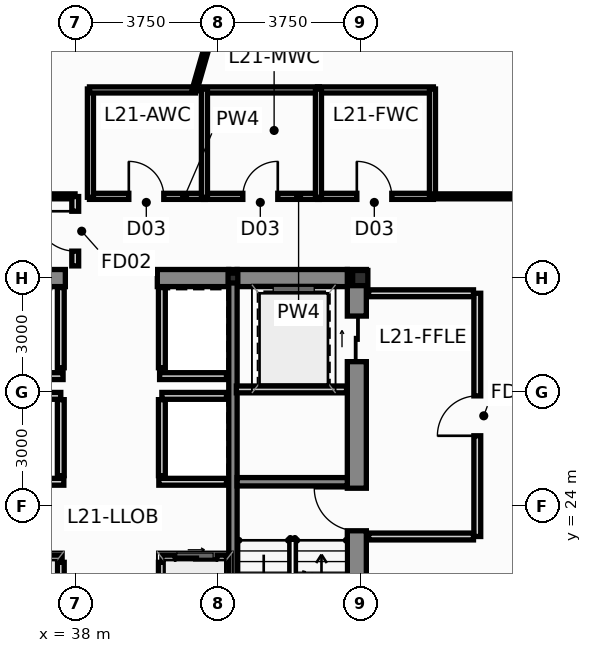
"""IFC4 building model, lengths in metres.
Left out: names, types, materials, properties, quantities, classifications, styles, units other than length and angle.
Written with IfcOpenShell. Run it as: python <this file> out.ifc"""

import sys

from ifc_helpers import new_model, si_unit, direction, frame, frame_2d, origin, origin_2d, place, context, subcontext, project, spatial, rectangle, i_section, extrude, source, transform, mapped, element, fill, save


model = new_model("IFC4")
c1 = context("Model", 3, precision=1e-05, world=origin(), true_north=direction((0.0, 1.0)))
c2 = subcontext(c1, "Body", "Model", "MODEL_VIEW")
j1 = project(units=[si_unit("LENGTHUNIT", "METRE"), si_unit("PLANEANGLEUNIT", "RADIAN")], contexts=[c1])
p1 = place(None, origin())
s1 = spatial("IfcSite", under=j1, at=p1, CompositionType="ELEMENT")
p2 = place(p1, origin())
s2 = spatial("IfcBuilding", under=s1, at=p2, CompositionType="ELEMENT")
p3 = place(p2, frame((0.0, 0.0, 83.5)))
s3 = spatial("IfcBuildingStorey", under=s2, at=p3, CompositionType="ELEMENT", Elevation=83.5)
m1 = source(origin(), c2, "Body", "SweptSolid", [
    extrude(i_section(OverallWidth=0.4, OverallDepth=0.4, WebThickness=0.02, FlangeThickness=0.032, at=origin_2d()), origin(), (0.0, 0.0, 1.0), 3.65),
])
p4 = place(p3, frame((45.5, 30.0, 0.0), z_axis=(0.0, 0.0, 1.0), x_axis=(1.0, 0.0, 0.0)))
e1 = element("IfcColumn", 1, at=p4, inside=s3, PredefinedType="COLUMN", context=c2, shape_type="MappedRepresentation", body=[
    mapped(m1, transform((0.0, 0.0, 0.0), scale=1.0)),
])
m2 = source(origin(), c2, "Body", "SweptSolid", [
    extrude(i_section(OverallWidth=0.256, OverallDepth=0.26, WebThickness=0.01, FlangeThickness=0.017, at=origin_2d()), origin(), (0.0, 0.0, 1.0), 3.65),
])
p5 = place(p3, frame((42.15, 30.0, 0.0), z_axis=(0.0, 0.0, 1.0), x_axis=(1.0, 0.0, 0.0)))
e2 = element("IfcColumn", 2, at=p5, inside=s3, PredefinedType="COLUMN", context=c2, shape_type="MappedRepresentation", body=[
    mapped(m2, transform((0.0, 0.0, 0.0), scale=1.0)),
])
p6 = place(p3, frame((45.41, 16.95, 0.0), z_axis=(0.0, 0.0, 1.0), x_axis=(0.0, 1.0, 0.0)))
e3 = element("IfcWall", 3, at=p6, inside=s3, PredefinedType="SHEAR", context=c2, shape_type="SweptSolid", body=[
    extrude(rectangle(XDim=13.275, YDim=0.5, at=frame_2d((6.638, 0.0))), origin(), (0.0, 0.0, 1.0), 3.65),
])
p7 = place(p6, frame((6.4, 0.0, 0.0)))
e4 = element("IfcOpeningElement", 4, at=p7, cuts=e3, PredefinedType="OPENING", context=c2, shape_type="SweptSolid", body=[
    extrude(rectangle(XDim=1.12, YDim=2.15, at=frame_2d((0.56, 1.075))), frame((0.0, 0.262, 0.0), z_axis=(0.0, -1.0, 0.0), x_axis=(1.0, 0.0, 0.0)), (0.0, 0.0, 1.0), 0.524),
])
p8 = place(p6, frame((10.85, 0.0, 0.0)))
e5 = element("IfcOpeningElement", 5, at=p8, cuts=e3, PredefinedType="OPENING", context=c2, shape_type="SweptSolid", body=[
    extrude(rectangle(XDim=1.2, YDim=2.2, at=frame_2d((0.6, 1.1))), frame((0.0, 0.262, 0.0), z_axis=(0.0, -1.0, 0.0), x_axis=(1.0, 0.0, 0.0)), (0.0, 0.0, 1.0), 0.524),
])
p9 = place(p3, frame((33.96, 30.0, 0.0), z_axis=(0.0, 0.0, 1.0), x_axis=(1.0, 0.0, 0.0)))
e6 = element("IfcWall", 6, at=p9, inside=s3, PredefinedType="SHEAR", context=c2, shape_type="SweptSolid", body=[
    extrude(rectangle(XDim=3.78, YDim=0.45, at=frame_2d((1.89, 0.0))), origin(), (0.0, 0.0, 1.0), 3.65),
])
p10 = place(p3, frame((40.16, 30.0, 0.0), z_axis=(0.0, 0.0, 1.0), x_axis=(1.0, 0.0, 0.0)))
e7 = element("IfcWall", 7, at=p10, inside=s3, PredefinedType="SHEAR", context=c2, shape_type="SweptSolid", body=[
    extrude(rectangle(XDim=1.88, YDim=0.45, at=frame_2d((0.94, 0.0))), origin(), (0.0, 0.0, 1.0), 3.65),
])
p11 = place(p3, frame((42.26, 30.0, 0.0), z_axis=(0.0, 0.0, 1.0), x_axis=(1.0, 0.0, 0.0)))
e8 = element("IfcWall", 8, at=p11, inside=s3, PredefinedType="SHEAR", context=c2, shape_type="SweptSolid", body=[
    extrude(rectangle(XDim=2.9, YDim=0.45, at=frame_2d((1.45, 0.0))), origin(), (0.0, 0.0, 1.0), 3.65),
])
p12 = place(p3, frame((42.15, 16.95, 0.0), z_axis=(0.0, 0.0, 1.0), x_axis=(0.0, 1.0, 0.0)))
e9 = element("IfcWall", 9, at=p12, inside=s3, PredefinedType="SHEAR", context=c2, shape_type="SweptSolid", body=[
    extrude(rectangle(XDim=13.275, YDim=0.22, at=frame_2d((6.638, 0.0))), origin(), (0.0, 0.0, 1.0), 3.65),
])
p13 = place(p3, frame((42.26, 24.64, 0.0), z_axis=(0.0, 0.0, 1.0), x_axis=(1.0, 0.0, 0.0)))
e10 = element("IfcWall", 10, at=p13, inside=s3, PredefinedType="SHEAR", context=c2, shape_type="SweptSolid", body=[
    extrude(rectangle(XDim=2.9, YDim=0.22, at=frame_2d((1.45, 0.0))), origin(), (0.0, 0.0, 1.0), 3.65),
])
p14 = place(p3, frame((34.02, 22.62, 0.0), z_axis=(0.0, 0.0, 1.0), x_axis=(1.0, 0.0, 0.0)))
e11 = element("IfcWall", 11, at=p14, inside=s3, PredefinedType="PARTITIONING", context=c2, shape_type="SweptSolid", body=[
    extrude(rectangle(XDim=3.6, YDim=0.18, at=frame_2d((1.8, 0.0))), origin(), (0.0, 0.0, 1.0), 3.4),
])
p15 = place(p14, frame((0.32, 0.0, 0.0)))
e12 = element("IfcOpeningElement", 12, at=p15, cuts=e11, PredefinedType="OPENING", context=c2, shape_type="SweptSolid", body=[
    extrude(rectangle(XDim=1.1, YDim=2.2, at=frame_2d((0.55, 1.1))), frame((0.0, 0.102, 0.0), z_axis=(0.0, -1.0, 0.0), x_axis=(1.0, 0.0, 0.0)), (0.0, 0.0, 1.0), 0.204),
])
p16 = place(p14, frame((2.12, 0.0, 0.0)))
e13 = element("IfcOpeningElement", 13, at=p16, cuts=e11, PredefinedType="OPENING", context=c2, shape_type="SweptSolid", body=[
    extrude(rectangle(XDim=1.1, YDim=2.2, at=frame_2d((0.55, 1.1))), frame((0.0, 0.102, 0.0), z_axis=(0.0, -1.0, 0.0), x_axis=(1.0, 0.0, 0.0)), (0.0, 0.0, 1.0), 0.204),
])
p17 = place(p3, frame((40.28, 22.62, 0.0), z_axis=(0.0, 0.0, 1.0), x_axis=(1.0, 0.0, 0.0)))
e14 = element("IfcWall", 14, at=p17, inside=s3, PredefinedType="PARTITIONING", context=c2, shape_type="SweptSolid", body=[
    extrude(rectangle(XDim=1.7, YDim=0.18, at=frame_2d((0.85, 0.0))), origin(), (0.0, 0.0, 1.0), 3.4),
])
p18 = place(p17, frame((0.35, 0.0, 0.0)))
e15 = element("IfcOpeningElement", 15, at=p18, cuts=e14, PredefinedType="OPENING", context=c2, shape_type="SweptSolid", body=[
    extrude(rectangle(XDim=1.1, YDim=2.2, at=frame_2d((0.55, 1.1))), frame((0.0, 0.102, 0.0), z_axis=(0.0, -1.0, 0.0), x_axis=(1.0, 0.0, 0.0)), (0.0, 0.0, 1.0), 0.204),
])
for number, where, z_axis, x_axis in (
    (16, (37.62, 20.52, 0.0), (0.0, 0.0, 1.0), (0.0, 1.0, 0.0)),
    (17, (40.28, 20.52, 0.0), (0.0, 0.0, 1.0), (0.0, 1.0, 0.0)),
):
    element("IfcWall", number, at=place(p3, frame(where, z_axis=z_axis, x_axis=x_axis)), inside=s3, PredefinedType="PARTITIONING", context=c2, shape_type="SweptSolid", body=[
        extrude(rectangle(XDim=2.0, YDim=0.18, at=frame_2d((1.0, 0.0))), origin(), (0.0, 0.0, 1.0), 3.4),
    ])
p19 = place(p3, frame((34.02, 26.9, 0.0), z_axis=(0.0, 0.0, 1.0), x_axis=(1.0, 0.0, 0.0)))
e18 = element("IfcWall", 18, at=p19, inside=s3, PredefinedType="PARTITIONING", context=c2, shape_type="SweptSolid", body=[
    extrude(rectangle(XDim=3.6, YDim=0.18, at=frame_2d((1.8, 0.0))), origin(), (0.0, 0.0, 1.0), 3.4),
])
p20 = place(p3, frame((40.28, 26.9, 0.0), z_axis=(0.0, 0.0, 1.0), x_axis=(1.0, 0.0, 0.0)))
e19 = element("IfcWall", 19, at=p20, inside=s3, PredefinedType="PARTITIONING", context=c2, shape_type="SweptSolid", body=[
    extrude(rectangle(XDim=1.7, YDim=0.18, at=frame_2d((0.85, 0.0))), origin(), (0.0, 0.0, 1.0), 3.4),
])
for number, where, z_axis, x_axis in (
    (20, (37.62, 24.8, 0.0), (0.0, 0.0, 1.0), (0.0, 1.0, 0.0)),
    (21, (40.28, 24.8, 0.0), (0.0, 0.0, 1.0), (0.0, 1.0, 0.0)),
):
    element("IfcWall", number, at=place(p3, frame(where, z_axis=z_axis, x_axis=x_axis)), inside=s3, PredefinedType="PARTITIONING", context=c2, shape_type="SweptSolid", body=[
        extrude(rectangle(XDim=2.0, YDim=0.18, at=frame_2d((1.0, 0.0))), origin(), (0.0, 0.0, 1.0), 3.4),
    ])
p21 = place(p3, frame((34.02, 24.64, 0.0), z_axis=(0.0, 0.0, 1.0), x_axis=(1.0, 0.0, 0.0)))
e22 = element("IfcWall", 22, at=p21, inside=s3, PredefinedType="PARTITIONING", context=c2, shape_type="SweptSolid", body=[
    extrude(rectangle(XDim=3.68, YDim=0.18, at=frame_2d((1.84, 0.0))), origin(), (0.0, 0.0, 1.0), 3.4),
])
p22 = place(p3, frame((40.2, 24.64, 0.0), z_axis=(0.0, 0.0, 1.0), x_axis=(1.0, 0.0, 0.0)))
e23 = element("IfcWall", 23, at=p22, inside=s3, PredefinedType="PARTITIONING", context=c2, shape_type="SweptSolid", body=[
    extrude(rectangle(XDim=1.78, YDim=0.18, at=frame_2d((0.89, 0.0))), origin(), (0.0, 0.0, 1.0), 3.4),
])
p23 = place(p3, frame((34.02, 27.42, 0.0), z_axis=(0.0, 0.0, 1.0), x_axis=(1.0, 0.0, 0.0)))
e24 = element("IfcWall", 24, at=p23, inside=s3, PredefinedType="PARTITIONING", context=c2, shape_type="SweptSolid", body=[
    extrude(rectangle(XDim=3.66, YDim=0.18, at=frame_2d((1.83, 0.0))), origin(), (0.0, 0.0, 1.0), 3.4),
])
p24 = place(p3, frame((40.22, 27.42, 0.0), z_axis=(0.0, 0.0, 1.0), x_axis=(1.0, 0.0, 0.0)))
e25 = element("IfcWall", 25, at=p24, inside=s3, PredefinedType="PARTITIONING", context=c2, shape_type="SweptSolid", body=[
    extrude(rectangle(XDim=1.76, YDim=0.18, at=frame_2d((0.88, 0.0))), origin(), (0.0, 0.0, 1.0), 3.4),
])
for number, where, z_axis, x_axis in (
    (26, (37.62, 27.64, 0.0), (0.0, 0.0, 1.0), (0.0, 1.0, 0.0)),
    (27, (40.28, 27.64, 0.0), (0.0, 0.0, 1.0), (0.0, 1.0, 0.0)),
):
    element("IfcWall", number, at=place(p3, frame(where, z_axis=z_axis, x_axis=x_axis)), inside=s3, PredefinedType="PARTITIONING", context=c2, shape_type="SweptSolid", body=[
        extrude(rectangle(XDim=2.11, YDim=0.18, at=frame_2d((1.055, 0.0))), origin(), (0.0, 0.0, 1.0), 3.4),
    ])
p25 = place(p3, frame((48.58, 23.2, 0.0), z_axis=(0.0, 0.0, 1.0), x_axis=(0.0, 1.0, 0.0)))
e28 = element("IfcWall", 28, at=p25, inside=s3, PredefinedType="PARTITIONING", context=c2, shape_type="SweptSolid", body=[
    extrude(rectangle(XDim=6.4, YDim=0.18, at=frame_2d((3.2, 0.0))), origin(), (0.0, 0.0, 1.0), 3.026),
])
p26 = place(p25, frame((2.65, 0.0, 0.0)))
e29 = element("IfcOpeningElement", 29, at=p26, cuts=e28, PredefinedType="OPENING", context=c2, shape_type="SweptSolid", body=[
    extrude(rectangle(XDim=1.05, YDim=2.15, at=frame_2d((0.525, 1.075))), frame((0.0, 0.102, 0.0), z_axis=(0.0, -1.0, 0.0), x_axis=(1.0, 0.0, 0.0)), (0.0, 0.0, 1.0), 0.204),
])
p27 = place(p3, frame((45.72, 23.2, 0.0), z_axis=(0.0, 0.0, 1.0), x_axis=(1.0, 0.0, 0.0)))
e30 = element("IfcWall", 30, at=p27, inside=s3, PredefinedType="PARTITIONING", context=c2, shape_type="SweptSolid", body=[
    extrude(rectangle(XDim=2.76, YDim=0.18, at=frame_2d((1.38, 0.0))), origin(), (0.0, 0.0, 1.0), 3.4),
])
p28 = place(p3, frame((45.72, 29.6, 0.0), z_axis=(0.0, 0.0, 1.0), x_axis=(1.0, 0.0, 0.0)))
e31 = element("IfcWall", 31, at=p28, inside=s3, PredefinedType="PARTITIONING", context=c2, shape_type="SweptSolid", body=[
    extrude(rectangle(XDim=2.76, YDim=0.18, at=frame_2d((1.38, 0.0))), origin(), (0.0, 0.0, 1.0), 2.783),
])
p29 = place(p3, frame((42.24, 27.07, 0.0), z_axis=(0.0, 0.0, 1.0), x_axis=(1.0, 0.0, 0.0)))
e32 = element("IfcWall", 32, at=p29, inside=s3, PredefinedType="PARTITIONING", context=c2, shape_type="SweptSolid", body=[
    extrude(rectangle(XDim=2.9, YDim=0.18, at=frame_2d((1.45, 0.0))), origin(), (0.0, 0.0, 1.0), 3.4),
])
p30 = place(p3, frame((38.375, 32.15, 0.0), z_axis=(0.0, 0.0, 1.0), x_axis=(1.0, 0.0, 0.0)))
e33 = element("IfcWall", 33, at=p30, inside=s3, PredefinedType="PLUMBINGWALL", context=c2, shape_type="SweptSolid", body=[
    extrude(rectangle(XDim=3.05, YDim=0.16, at=frame_2d((1.525, 0.0))), origin(), (0.0, 0.0, 1.0), 3.4),
])
p31 = place(p30, frame((1.035, 0.0, 0.0)))
e34 = element("IfcOpeningElement", 34, at=p31, cuts=e33, PredefinedType="OPENING", context=c2, shape_type="SweptSolid", body=[
    extrude(rectangle(XDim=0.92, YDim=2.1, at=frame_2d((0.46, 1.05))), frame((0.0, 0.092, 0.0), z_axis=(0.0, -1.0, 0.0), x_axis=(1.0, 0.0, 0.0)), (0.0, 0.0, 1.0), 0.184),
])
p32 = place(p3, frame((41.375, 32.15, 0.0), z_axis=(0.0, 0.0, 1.0), x_axis=(1.0, 0.0, 0.0)))
e35 = element("IfcWall", 35, at=p32, inside=s3, PredefinedType="PLUMBINGWALL", context=c2, shape_type="SweptSolid", body=[
    extrude(rectangle(XDim=3.05, YDim=0.16, at=frame_2d((1.525, 0.0))), origin(), (0.0, 0.0, 1.0), 3.4),
])
p33 = place(p32, frame((1.035, 0.0, 0.0)))
e36 = element("IfcOpeningElement", 36, at=p33, cuts=e35, PredefinedType="OPENING", context=c2, shape_type="SweptSolid", body=[
    extrude(rectangle(XDim=0.92, YDim=2.1, at=frame_2d((0.46, 1.05))), frame((0.0, 0.092, 0.0), z_axis=(0.0, -1.0, 0.0), x_axis=(1.0, 0.0, 0.0)), (0.0, 0.0, 1.0), 0.184),
])
p34 = place(p3, frame((44.375, 32.15, 0.0), z_axis=(0.0, 0.0, 1.0), x_axis=(1.0, 0.0, 0.0)))
e37 = element("IfcWall", 37, at=p34, inside=s3, PredefinedType="PLUMBINGWALL", context=c2, shape_type="SweptSolid", body=[
    extrude(rectangle(XDim=3.05, YDim=0.16, at=frame_2d((1.525, 0.0))), origin(), (0.0, 0.0, 1.0), 3.4),
])
p35 = place(p34, frame((1.035, 0.0, 0.0)))
e38 = element("IfcOpeningElement", 38, at=p35, cuts=e37, PredefinedType="OPENING", context=c2, shape_type="SweptSolid", body=[
    extrude(rectangle(XDim=0.92, YDim=2.1, at=frame_2d((0.46, 1.05))), frame((0.0, 0.092, 0.0), z_axis=(0.0, -1.0, 0.0), x_axis=(1.0, 0.0, 0.0)), (0.0, 0.0, 1.0), 0.184),
])
for number, where, z_axis, x_axis in (
    (39, (41.375, 34.95, 0.0), (0.0, 0.0, 1.0), (1.0, 0.0, 0.0)),
    (40, (47.425, 34.95, 0.0), (0.0, 0.0, 1.0), (-1.0, 0.0, 0.0)),
):
    element("IfcWall", number, at=place(p3, frame(where, z_axis=z_axis, x_axis=x_axis)), inside=s3, PredefinedType="PLUMBINGWALL", context=c2, shape_type="SweptSolid", body=[
        extrude(rectangle(XDim=3.05, YDim=0.16, at=frame_2d((1.525, 0.0))), origin(), (0.0, 0.0, 1.0), 3.026),
    ])
for number, where, z_axis, x_axis in (
    (41, (41.4, 32.125, 0.0), (0.0, 0.0, 1.0), (0.0, 1.0, 0.0)),
    (42, (38.4, 32.125, 0.0), (0.0, 0.0, 1.0), (0.0, 1.0, 0.0)),
    (43, (44.4, 32.125, 0.0), (0.0, 0.0, 1.0), (0.0, 1.0, 0.0)),
    (44, (47.4, 32.125, 0.0), (0.0, 0.0, 1.0), (0.0, 1.0, 0.0)),
):
    element("IfcWall", number, at=place(p3, frame(where, z_axis=z_axis, x_axis=x_axis)), inside=s3, PredefinedType="PLUMBINGWALL", context=c2, shape_type="SweptSolid", body=[
        extrude(rectangle(XDim=2.85, YDim=0.16, at=frame_2d((1.425, 0.0))), origin(), (0.0, 0.0, 1.0), 3.4),
    ])
p36 = place(p3, frame((38.375, 34.95, 0.0), z_axis=(0.0, 0.0, 1.0), x_axis=(1.0, 0.0, 0.0)))
e45 = element("IfcWall", 45, at=p36, inside=s3, PredefinedType="PLUMBINGWALL", context=c2, shape_type="SweptSolid", body=[
    extrude(rectangle(XDim=2.79, YDim=0.16, at=frame_2d((1.395, 0.0))), origin(), (0.0, 0.0, 1.0), 3.026),
])
p37 = place(p3, frame((41.141, 34.955, 0.0), z_axis=(0.0, 0.0, 1.0), x_axis=(0.27567644494, 0.961250486453, 0.0)))
e46 = element("IfcWall", 46, at=p37, inside=s3, PredefinedType="PARTITIONING", context=c2, shape_type="SweptSolid", body=[
    extrude(rectangle(XDim=15.355, YDim=0.13, at=frame_2d((7.678, 0.0))), origin(), (0.0, 0.0, 1.0), 3.4),
])
p38 = place(p3, frame((33.485, 32.15, 0.0), z_axis=(0.0, 0.0, 1.0), x_axis=(1.0, 0.0, 0.0)))
e47 = element("IfcWall", 47, at=p38, inside=s3, PredefinedType="PARTITIONING", context=c2, shape_type="SweptSolid", body=[
    extrude(rectangle(XDim=4.51, YDim=0.13, at=frame_2d((2.255, 0.0))), origin(), (0.0, 0.0, 1.0), 3.4),
])
p39 = place(p38, frame((1.775, 0.0, 0.0)))
e48 = element("IfcOpeningElement", 48, at=p39, cuts=e47, PredefinedType="OPENING", context=c2, shape_type="SweptSolid", body=[
    extrude(rectangle(XDim=0.96, YDim=2.15, at=frame_2d((0.48, 1.075))), frame((0.0, 0.077, 0.0), z_axis=(0.0, -1.0, 0.0), x_axis=(1.0, 0.0, 0.0)), (0.0, 0.0, 1.0), 0.154),
])
p40 = place(p3, frame((47.405, 32.15, 0.0), z_axis=(0.0, 0.0, 1.0), x_axis=(1.0, 0.0, 0.0)))
e49 = element("IfcWall", 49, at=p40, inside=s3, PredefinedType="PARTITIONING", context=c2, shape_type="SweptSolid", body=[
    extrude(rectangle(XDim=3.19, YDim=0.13, at=frame_2d((1.595, 0.0))), origin(), (0.0, 0.0, 1.0), 3.4),
])
p41 = place(p3, frame((38.0, 30.32, 0.0), z_axis=(0.0, 0.0, 1.0), x_axis=(0.0, 1.0, 0.0)))
e50 = element("IfcWall", 50, at=p41, inside=s3, PredefinedType="PARTITIONING", context=c2, shape_type="SweptSolid", body=[
    extrude(rectangle(XDim=1.825, YDim=0.18, at=frame_2d((0.913, 0.0))), origin(), (0.0, 0.0, 1.0), 3.4),
])
p42 = place(p41, frame((0.388, 0.0, 0.0)))
e51 = element("IfcOpeningElement", 51, at=p42, cuts=e50, PredefinedType="OPENING", context=c2, shape_type="SweptSolid", body=[
    extrude(rectangle(XDim=1.05, YDim=2.15, at=frame_2d((0.525, 1.075))), frame((0.0, 0.102, 0.0), z_axis=(0.0, -1.0, 0.0), x_axis=(1.0, 0.0, 0.0)), (0.0, 0.0, 1.0), 0.204),
])
p43 = place(p7, origin())
e52 = element("IfcDoor", 52, at=p43, inside=s3, OperationType="SINGLE_SWING_RIGHT", PredefinedType="DOOR", context=c2, shape_type="SweptSolid", body=[
    extrude(rectangle(XDim=1.12, YDim=2.15, at=frame_2d((0.56, 1.075))), frame((0.0, 0.025, 0.0), z_axis=(0.0, -1.0, 0.0), x_axis=(1.0, 0.0, 0.0)), (0.0, 0.0, 1.0), 0.05),
])
fill(e4, e52)
p44 = place(p8, origin())
e53 = element("IfcDoor", 53, at=p44, inside=s3, OperationType="SLIDING_TO_RIGHT", PredefinedType="DOOR", context=c2, shape_type="SweptSolid", body=[
    extrude(rectangle(XDim=1.2, YDim=2.2, at=frame_2d((0.6, 1.1))), frame((0.0, 0.025, 0.0), z_axis=(0.0, -1.0, 0.0), x_axis=(1.0, 0.0, 0.0)), (0.0, 0.0, 1.0), 0.05),
])
fill(e5, e53)
p45 = place(p18, origin())
e54 = element("IfcDoor", 54, at=p45, inside=s3, OperationType="SLIDING_TO_LEFT", PredefinedType="DOOR", context=c2, shape_type="SweptSolid", body=[
    extrude(rectangle(XDim=1.1, YDim=2.2, at=frame_2d((0.55, 1.1))), frame((0.0, 0.025, 0.0), z_axis=(0.0, -1.0, 0.0), x_axis=(1.0, 0.0, 0.0)), (0.0, 0.0, 1.0), 0.05),
])
fill(e15, e54)
p46 = place(p26, origin())
e55 = element("IfcDoor", 55, at=p46, inside=s3, OperationType="SINGLE_SWING_LEFT", PredefinedType="DOOR", context=c2, shape_type="SweptSolid", body=[
    extrude(rectangle(XDim=1.05, YDim=2.15, at=frame_2d((0.525, 1.075))), frame((0.0, 0.025, 0.0), z_axis=(0.0, -1.0, 0.0), x_axis=(1.0, 0.0, 0.0)), (0.0, 0.0, 1.0), 0.05),
])
fill(e29, e55)
p47 = place(p31, origin())
e56 = element("IfcDoor", 56, at=p47, inside=s3, OperationType="SINGLE_SWING_LEFT", PredefinedType="DOOR", context=c2, shape_type="SweptSolid", body=[
    extrude(rectangle(XDim=0.92, YDim=2.1, at=frame_2d((0.46, 1.05))), frame((0.0, 0.025, 0.0), z_axis=(0.0, -1.0, 0.0), x_axis=(1.0, 0.0, 0.0)), (0.0, 0.0, 1.0), 0.05),
])
fill(e34, e56)
p48 = place(p33, origin())
e57 = element("IfcDoor", 57, at=p48, inside=s3, OperationType="SINGLE_SWING_RIGHT", PredefinedType="DOOR", context=c2, shape_type="SweptSolid", body=[
    extrude(rectangle(XDim=0.92, YDim=2.1, at=frame_2d((0.46, 1.05))), frame((0.0, 0.025, 0.0), z_axis=(0.0, -1.0, 0.0), x_axis=(1.0, 0.0, 0.0)), (0.0, 0.0, 1.0), 0.05),
])
fill(e36, e57)
p49 = place(p35, origin())
e58 = element("IfcDoor", 58, at=p49, inside=s3, OperationType="SINGLE_SWING_LEFT", PredefinedType="DOOR", context=c2, shape_type="SweptSolid", body=[
    extrude(rectangle(XDim=0.92, YDim=2.1, at=frame_2d((0.46, 1.05))), frame((0.0, 0.025, 0.0), z_axis=(0.0, -1.0, 0.0), x_axis=(1.0, 0.0, 0.0)), (0.0, 0.0, 1.0), 0.05),
])
fill(e38, e58)
p50 = place(p42, origin())
e59 = element("IfcDoor", 59, at=p50, inside=s3, OperationType="SINGLE_SWING_RIGHT", PredefinedType="DOOR", context=c2, shape_type="SweptSolid", body=[
    extrude(rectangle(XDim=1.05, YDim=2.15, at=frame_2d((0.525, 1.075))), frame((0.0, 0.025, 0.0), z_axis=(0.0, -1.0, 0.0), x_axis=(1.0, 0.0, 0.0)), (0.0, 0.0, 1.0), 0.05),
])
fill(e51, e59)
save(model, sys.argv[1])
